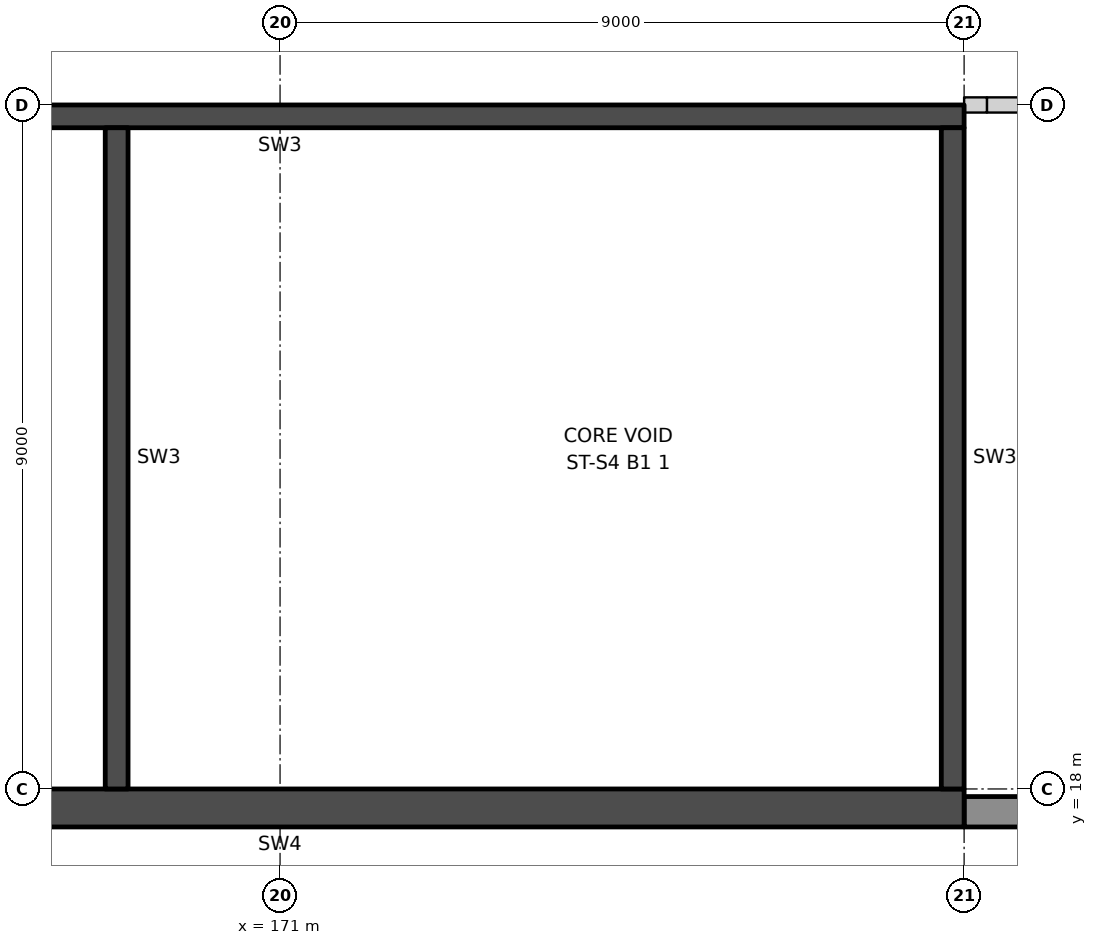
"""IFC4 building model, lengths in metres.
Left out: names, types, materials, properties, quantities, classifications, styles, units other than length and angle.
Written with IfcOpenShell. Run it as: python <this file> out.ifc"""

import sys

from ifc_helpers import new_model, si_unit, direction, frame, frame_2d, origin, place, context, subcontext, project, spatial, rectangle, extrude, element, save


model = new_model("IFC4")
c1 = context("Model", 3, precision=1e-05, world=origin(), true_north=direction((0.0, 1.0)))
c2 = subcontext(c1, "Body", "Model", "MODEL_VIEW")
j1 = project(units=[si_unit("LENGTHUNIT", "METRE"), si_unit("PLANEANGLEUNIT", "RADIAN")], contexts=[c1])
p1 = place(None, origin())
s1 = spatial("IfcSite", under=j1, at=p1, CompositionType="ELEMENT")
p2 = place(p1, origin())
s2 = spatial("IfcBuilding", under=s1, at=p2, CompositionType="ELEMENT")
p3 = place(p2, frame((0.0, 0.0, -6.0)))
s3 = spatial("IfcBuildingStorey", under=s2, at=p3, CompositionType="ELEMENT", Elevation=-6.0)
p4 = place(p3, frame((180.3, 27.0, 0.0), z_axis=(0.0, 0.0, 1.0), x_axis=(1.0, 0.0, 0.0)))
e1 = element("IfcWall", 1, at=p4, inside=s3, PredefinedType="PARTITIONING", context=c2, shape_type="SweptSolid", body=[
    extrude(rectangle(XDim=8.7, YDim=0.2, at=frame_2d((4.35, 0.0))), origin(), (0.0, 0.0, 1.0), 4.55),
])
p5 = place(p4, frame((3.3, 0.0, 0.0)))
e2 = element("IfcOpeningElement", 2, at=p5, cuts=e1, PredefinedType="OPENING", context=c2, shape_type="SweptSolid", body=[
    extrude(rectangle(XDim=1.8, YDim=2.1, at=frame_2d((0.9, 1.05))), frame((0.0, 0.11, 0.0), z_axis=(0.0, -1.0, 0.0), x_axis=(1.0, 0.0, 0.0)), (0.0, 0.0, 1.0), 0.22),
])
p6 = place(p3, frame((180.0, 17.7, 0.0), z_axis=(0.0, 0.0, 1.0), x_axis=(1.0, 0.0, 0.0)))
e3 = element("IfcWall", 3, at=p6, inside=s3, PredefinedType="SOLIDWALL", context=c2, shape_type="SweptSolid", body=[
    extrude(rectangle(XDim=9.0, YDim=0.4, at=frame_2d((4.5, 0.0))), origin(), (0.0, 0.0, 1.0), 6.0),
])
p7 = place(p3, frame((180.0, 26.85, 0.0), z_axis=(0.0, 0.0, 1.0), x_axis=(-1.0, 0.0, 0.0)))
e4 = element("IfcWall", 4, at=p7, inside=s3, PredefinedType="SHEAR", context=c2, shape_type="SweptSolid", body=[
    extrude(rectangle(XDim=18.0, YDim=0.3, at=frame_2d((9.0, 0.0))), origin(), (0.0, 0.0, 1.0), 6.0),
])
p8 = place(p3, frame((180.0, 17.75, 0.0), z_axis=(0.0, 0.0, 1.0), x_axis=(-1.0, 0.0, 0.0)))
e5 = element("IfcWall", 5, at=p8, inside=s3, PredefinedType="SHEAR", context=c2, shape_type="SweptSolid", body=[
    extrude(rectangle(XDim=18.0, YDim=0.5, at=frame_2d((9.0, 0.0))), origin(), (0.0, 0.0, 1.0), 6.0),
])
for number, where, z_axis, x_axis in (
    (6, (179.85, 26.7, 0.0), (0.0, 0.0, 1.0), (0.0, -1.0, 0.0)),
    (7, (168.85, 26.7, 0.0), (0.0, 0.0, 1.0), (0.0, -1.0, 0.0)),
):
    element("IfcWall", number, at=place(p3, frame(where, z_axis=z_axis, x_axis=x_axis)), inside=s3, PredefinedType="SHEAR", context=c2, shape_type="SweptSolid", body=[
        extrude(rectangle(XDim=8.7, YDim=0.3, at=frame_2d((4.35, 0.0))), origin(), (0.0, 0.0, 1.0), 6.0),
    ])
p9 = place(p3, frame((180.0, 27.0, 0.0), z_axis=(0.0, 0.0, 1.0), x_axis=(1.0, 0.0, 0.0)))
e8 = element("IfcWall", 8, at=p9, inside=s3, PredefinedType="PARTITIONING", context=c2, shape_type="SweptSolid", body=[
    extrude(rectangle(XDim=0.3, YDim=0.2, at=frame_2d((0.15, 0.0))), origin(), (0.0, 0.0, 1.0), 6.0),
])
save(model, sys.argv[1])
